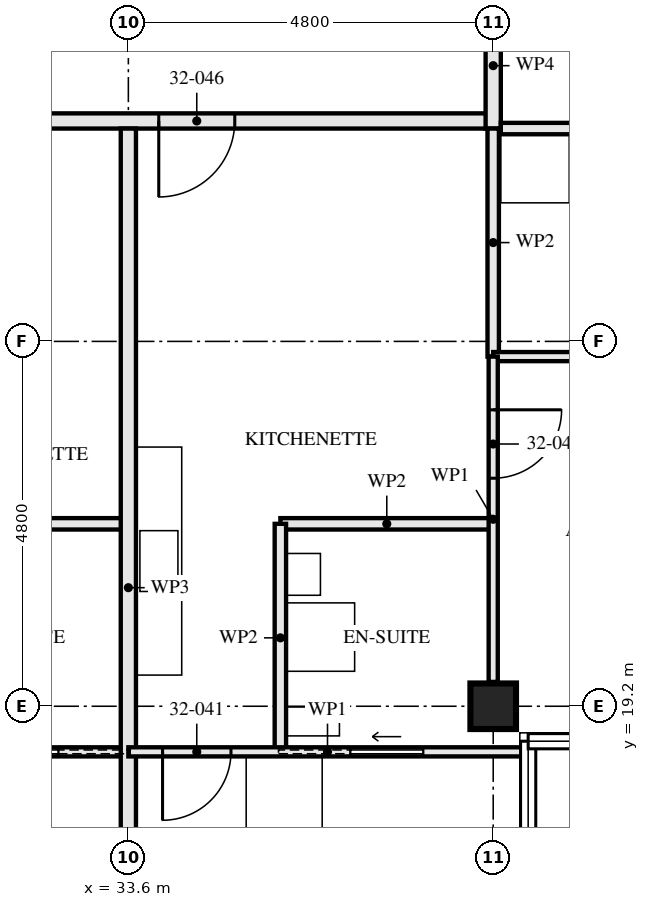
"""IFC4 building model, lengths in metres.
Left out: names, types, materials, properties, quantities, classifications, styles, units other than length and angle.
Written with IfcOpenShell. Run it as: python <this file> out.ifc"""

import sys

from ifc_helpers import new_model, si_unit, direction, frame, frame_2d, origin, origin_2d, place, context, subcontext, project, spatial, rectangle, hollow_rectangle, extrude, element, fill, save


model = new_model("IFC4")
c1 = context("Model", 3, precision=1e-05, world=origin(), true_north=direction((0.0, 1.0)))
c2 = subcontext(c1, "Body", "Model", "MODEL_VIEW")
j1 = project(units=[si_unit("LENGTHUNIT", "METRE"), si_unit("PLANEANGLEUNIT", "RADIAN")], contexts=[c1])
p1 = place(None, origin())
s1 = spatial("IfcSite", under=j1, at=p1, CompositionType="ELEMENT")
p2 = place(p1, origin())
s2 = spatial("IfcBuilding", under=s1, at=p2, CompositionType="ELEMENT")
p3 = place(p2, frame((0.0, 0.0, 119.0)))
s3 = spatial("IfcBuildingStorey", under=s2, at=p3, CompositionType="ELEMENT", Elevation=119.0)
p4 = place(p3, frame((38.4, 19.2, 0.0), z_axis=(0.0, 0.0, 1.0), x_axis=(0.0, 1.0, 0.0)))
e1 = element("IfcColumn", 1, at=p4, inside=s3, PredefinedType="COLUMN", context=c2, shape_type="SweptSolid", body=[
    extrude(hollow_rectangle(XDim=0.6, YDim=0.6, WallThickness=0.08, at=origin_2d()), origin(), (0.0, 0.0, 1.0), 3.5),
])
p5 = place(p3, frame((30.8, 21.6, 0.0), z_axis=(0.0, 0.0, 1.0), x_axis=(1.0, 0.0, 0.0)))
e2 = element("IfcWall", 2, at=p5, inside=s3, PredefinedType="PARTITIONING", context=c2, shape_type="SweptSolid", body=[
    extrude(rectangle(XDim=2.8, YDim=0.15, at=frame_2d((1.4, 0.0))), origin(), (0.0, 0.0, 1.0), 3.33),
])
p6 = place(p3, frame((28.8, 18.6, 0.0), z_axis=(0.0, 0.0, 1.0), x_axis=(1.0, 0.0, 0.0)))
e3 = element("IfcWall", 3, at=p6, inside=s3, PredefinedType="PARTITIONING", context=c2, shape_type="SweptSolid", body=[
    extrude(rectangle(XDim=4.8, YDim=0.12, at=frame_2d((2.4, 0.0))), origin(), (0.0, 0.0, 1.0), 3.33),
])
p7 = place(p6, frame((0.925, 0.0, 0.0)))
e4 = element("IfcOpeningElement", 4, at=p7, cuts=e3, PredefinedType="OPENING", context=c2, shape_type="SweptSolid", body=[
    extrude(rectangle(XDim=0.9, YDim=2.1, at=frame_2d((0.45, 1.05))), frame((0.0, 0.071, 0.0), z_axis=(0.0, -1.0, 0.0), x_axis=(1.0, 0.0, 0.0)), (0.0, 0.0, 1.0), 0.141),
])
p8 = place(p6, frame((2.925, 0.0, 0.0)))
e5 = element("IfcOpeningElement", 5, at=p8, cuts=e3, PredefinedType="OPENING", context=c2, shape_type="SweptSolid", body=[
    extrude(rectangle(XDim=0.95, YDim=2.1, at=frame_2d((0.475, 1.05))), frame((0.0, 0.071, 0.0), z_axis=(0.0, -1.0, 0.0), x_axis=(1.0, 0.0, 0.0)), (0.0, 0.0, 1.0), 0.141),
])
p9 = place(p3, frame((33.6, 14.72, 0.0), z_axis=(0.0, 0.0, 1.0), x_axis=(0.0, 1.0, 0.0)))
e6 = element("IfcWall", 6, at=p9, inside=s3, PredefinedType="PARTITIONING", context=c2, shape_type="SweptSolid", body=[
    extrude(rectangle(XDim=12.08, YDim=0.2, at=frame_2d((6.04, 0.0))), origin(), (0.0, 0.0, 1.0), 2.55),
])
p10 = place(p3, frame((35.6, 18.6, 0.0), z_axis=(0.0, 0.0, 1.0), x_axis=(0.0, 1.0, 0.0)))
e7 = element("IfcWall", 7, at=p10, inside=s3, PredefinedType="PARTITIONING", context=c2, shape_type="SweptSolid", body=[
    extrude(rectangle(XDim=3.0, YDim=0.15, at=frame_2d((1.5, 0.0))), origin(), (0.0, 0.0, 1.0), 2.55),
])
p11 = place(p3, frame((35.6, 21.6, 0.0), z_axis=(0.0, 0.0, 1.0), x_axis=(1.0, 0.0, 0.0)))
e8 = element("IfcWall", 8, at=p11, inside=s3, PredefinedType="PARTITIONING", context=c2, shape_type="SweptSolid", body=[
    extrude(rectangle(XDim=2.8, YDim=0.15, at=frame_2d((1.4, 0.0))), origin(), (0.0, 0.0, 1.0), 3.33),
])
p12 = place(p3, frame((38.4, 23.8, 0.0), z_axis=(0.0, 0.0, 1.0), x_axis=(0.0, 1.0, 0.0)))
e9 = element("IfcWall", 9, at=p12, inside=s3, PredefinedType="PARTITIONING", context=c2, shape_type="SweptSolid", body=[
    extrude(rectangle(XDim=3.0, YDim=0.15, at=frame_2d((1.5, 0.0))), origin(), (0.0, 0.0, 1.0), 2.55),
])
p13 = place(p3, frame((33.6, 18.6, 0.0), z_axis=(0.0, 0.0, 1.0), x_axis=(1.0, 0.0, 0.0)))
e10 = element("IfcWall", 10, at=p13, inside=s3, PredefinedType="PARTITIONING", context=c2, shape_type="SweptSolid", body=[
    extrude(rectangle(XDim=5.24, YDim=0.12, at=frame_2d((2.62, 0.0))), origin(), (0.0, 0.0, 1.0), 2.32),
])
p14 = place(p13, frame((0.45, 0.0, 0.0)))
e11 = element("IfcOpeningElement", 11, at=p14, cuts=e10, PredefinedType="OPENING", context=c2, shape_type="SweptSolid", body=[
    extrude(rectangle(XDim=0.9, YDim=2.1, at=frame_2d((0.45, 1.05))), frame((0.0, 0.071, 0.0), z_axis=(0.0, -1.0, 0.0), x_axis=(1.0, 0.0, 0.0)), (0.0, 0.0, 1.0), 0.141),
])
p15 = place(p13, frame((2.925, 0.0, 0.0)))
e12 = element("IfcOpeningElement", 12, at=p15, cuts=e10, PredefinedType="OPENING", context=c2, shape_type="SweptSolid", body=[
    extrude(rectangle(XDim=0.95, YDim=2.1, at=frame_2d((0.475, 1.05))), frame((0.0, 0.071, 0.0), z_axis=(0.0, -1.0, 0.0), x_axis=(1.0, 0.0, 0.0)), (0.0, 0.0, 1.0), 0.141),
])
p16 = place(p3, frame((38.4, 23.8, 0.0), z_axis=(0.0, 0.0, 1.0), x_axis=(1.0, 0.0, 0.0)))
e13 = element("IfcWall", 13, at=p16, inside=s3, PredefinedType="PARTITIONING", context=c2, shape_type="SweptSolid", body=[
    extrude(rectangle(XDim=4.48, YDim=0.12, at=frame_2d((2.24, 0.0))), origin(), (0.0, 0.0, 1.0), 3.33),
])
p17 = place(p16, frame((1.925, 0.0, 0.0)))
e14 = element("IfcOpeningElement", 14, at=p17, cuts=e13, PredefinedType="OPENING", context=c2, shape_type="SweptSolid", body=[
    extrude(rectangle(XDim=0.95, YDim=2.1, at=frame_2d((0.475, 1.05))), frame((0.0, 0.071, 0.0), z_axis=(0.0, -1.0, 0.0), x_axis=(1.0, 0.0, 0.0)), (0.0, 0.0, 1.0), 0.141),
])
p18 = place(p3, frame((38.4, 19.52, 0.0), z_axis=(0.0, 0.0, 1.0), x_axis=(0.0, 1.0, 0.0)))
e15 = element("IfcWall", 15, at=p18, inside=s3, PredefinedType="PARTITIONING", context=c2, shape_type="SweptSolid", body=[
    extrude(rectangle(XDim=4.28, YDim=0.12, at=frame_2d((2.14, 0.0))), origin(), (0.0, 0.0, 1.0), 3.33),
])
p19 = place(p18, frame((2.68, 0.0, 0.0)))
e16 = element("IfcOpeningElement", 16, at=p19, cuts=e15, PredefinedType="OPENING", context=c2, shape_type="SweptSolid", body=[
    extrude(rectangle(XDim=0.9, YDim=2.1, at=frame_2d((0.45, 1.05))), frame((0.0, 0.071, 0.0), z_axis=(0.0, -1.0, 0.0), x_axis=(1.0, 0.0, 0.0)), (0.0, 0.0, 1.0), 0.141),
])
p20 = place(p3, frame((28.8, 26.9, 0.0), z_axis=(0.0, 0.0, 1.0), x_axis=(1.0, 0.0, 0.0)))
e17 = element("IfcWall", 17, at=p20, inside=s3, PredefinedType="PARTITIONING", context=c2, shape_type="SweptSolid", body=[
    extrude(rectangle(XDim=9.6, YDim=0.2, at=frame_2d((4.8, 0.0))), origin(), (0.0, 0.0, 1.0), 3.33),
])
p21 = place(p20, frame((0.4, 0.0, 0.0)))
e18 = element("IfcOpeningElement", 18, at=p21, cuts=e17, PredefinedType="OPENING", context=c2, shape_type="SweptSolid", body=[
    extrude(rectangle(XDim=1.0, YDim=2.1, at=frame_2d((0.5, 1.05))), frame((0.0, 0.111, 0.0), z_axis=(0.0, -1.0, 0.0), x_axis=(1.0, 0.0, 0.0)), (0.0, 0.0, 1.0), 0.221),
])
p22 = place(p20, frame((5.2, 0.0, 0.0)))
e19 = element("IfcOpeningElement", 19, at=p22, cuts=e17, PredefinedType="OPENING", context=c2, shape_type="SweptSolid", body=[
    extrude(rectangle(XDim=1.0, YDim=2.1, at=frame_2d((0.5, 1.05))), frame((0.0, 0.111, 0.0), z_axis=(0.0, -1.0, 0.0), x_axis=(1.0, 0.0, 0.0)), (0.0, 0.0, 1.0), 0.221),
])
p23 = place(p3, frame((38.4, 26.8, 0.0), z_axis=(0.0, 0.0, 1.0), x_axis=(0.0, 1.0, 0.0)))
e20 = element("IfcWall", 20, at=p23, inside=s3, PredefinedType="PARTITIONING", context=c2, shape_type="SweptSolid", body=[
    extrude(rectangle(XDim=1.655, YDim=0.2, at=frame_2d((0.828, 0.0))), origin(), (0.0, 0.0, 1.0), 3.33),
])
p24 = place(p3, frame((38.5, 26.8, 0.0), z_axis=(0.0, 0.0, 1.0), x_axis=(1.0, 0.0, 0.0)))
e21 = element("IfcWall", 21, at=p24, inside=s3, PredefinedType="PARTITIONING", context=c2, shape_type="SweptSolid", body=[
    extrude(rectangle(XDim=5.14, YDim=0.15, at=frame_2d((2.57, 0.0))), origin(), (0.0, 0.0, 1.0), 2.32),
])
p25 = place(p8, origin())
e22 = element("IfcDoor", 22, at=p25, inside=s3, OperationType="SLIDING_TO_LEFT", PredefinedType="DOOR", context=c2, shape_type="SweptSolid", body=[
    extrude(rectangle(XDim=0.95, YDim=2.1, at=frame_2d((0.475, 1.05))), frame((0.0, 0.022, 0.0), z_axis=(0.0, -1.0, 0.0), x_axis=(1.0, 0.0, 0.0)), (0.0, 0.0, 1.0), 0.044),
])
fill(e5, e22)
p26 = place(p14, frame((0.9, 0.0, 0.0), z_axis=(0.0, 0.0, 1.0), x_axis=(-1.0, 0.0, 0.0)))
e23 = element("IfcDoor", 23, at=p26, inside=s3, OperationType="SINGLE_SWING_LEFT", PredefinedType="DOOR", context=c2, shape_type="SweptSolid", body=[
    extrude(rectangle(XDim=0.9, YDim=2.1, at=frame_2d((0.45, 1.05))), frame((0.0, 0.022, 0.0), z_axis=(0.0, -1.0, 0.0), x_axis=(1.0, 0.0, 0.0)), (0.0, 0.0, 1.0), 0.044),
])
fill(e11, e23)
p27 = place(p15, origin())
e24 = element("IfcDoor", 24, at=p27, inside=s3, OperationType="SLIDING_TO_RIGHT", PredefinedType="DOOR", context=c2, shape_type="SweptSolid", body=[
    extrude(rectangle(XDim=0.95, YDim=2.1, at=frame_2d((0.475, 1.05))), frame((0.0, 0.022, 0.0), z_axis=(0.0, -1.0, 0.0), x_axis=(1.0, 0.0, 0.0)), (0.0, 0.0, 1.0), 0.044),
])
fill(e12, e24)
p28 = place(p19, frame((0.9, 0.0, 0.0), z_axis=(0.0, 0.0, 1.0), x_axis=(-1.0, 0.0, 0.0)))
e25 = element("IfcDoor", 25, at=p28, inside=s3, OperationType="SINGLE_SWING_RIGHT", PredefinedType="DOOR", context=c2, shape_type="SweptSolid", body=[
    extrude(rectangle(XDim=0.9, YDim=2.1, at=frame_2d((0.45, 1.05))), frame((0.0, 0.022, 0.0), z_axis=(0.0, -1.0, 0.0), x_axis=(1.0, 0.0, 0.0)), (0.0, 0.0, 1.0), 0.044),
])
fill(e16, e25)
p29 = place(p22, frame((1.0, 0.0, 0.0), z_axis=(0.0, 0.0, 1.0), x_axis=(-1.0, 0.0, 0.0)))
e26 = element("IfcDoor", 26, at=p29, inside=s3, OperationType="SINGLE_SWING_LEFT", PredefinedType="DOOR", context=c2, shape_type="SweptSolid", body=[
    extrude(rectangle(XDim=1.0, YDim=2.1, at=frame_2d((0.5, 1.05))), frame((0.0, 0.027, 0.0), z_axis=(0.0, -1.0, 0.0), x_axis=(1.0, 0.0, 0.0)), (0.0, 0.0, 1.0), 0.054),
])
fill(e19, e26)
save(model, sys.argv[1])
